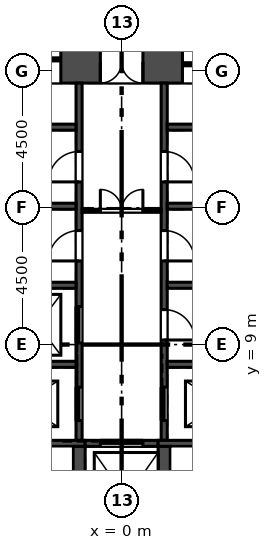
"""IFC4 building model, lengths in metres.
Left out: names, types, materials, properties, quantities, classifications, styles, units other than length and angle.
Written with IfcOpenShell. Run it as: python <this file> out.ifc"""

import sys

from ifc_helpers import new_model, si_unit, direction, frame, frame_2d, origin, place, context, subcontext, project, spatial, rectangle, extrude, element, fill, save


model = new_model("IFC4")
c1 = context("Model", 3, precision=1e-05, world=origin(), true_north=direction((0.0, 1.0)))
c2 = subcontext(c1, "Body", "Model", "MODEL_VIEW")
j1 = project(units=[si_unit("LENGTHUNIT", "METRE"), si_unit("PLANEANGLEUNIT", "RADIAN")], contexts=[c1])
p1 = place(None, origin())
s1 = spatial("IfcSite", under=j1, at=p1, CompositionType="ELEMENT")
p2 = place(p1, origin())
s2 = spatial("IfcBuilding", under=s1, at=p2, CompositionType="ELEMENT")
p3 = place(p2, frame((0.0, 0.0, -8.0)))
s3 = spatial("IfcBuildingStorey", under=s2, at=p3, CompositionType="ELEMENT", Elevation=-8.0)
p4 = place(p3, frame((9.412, 18.3, 0.0), z_axis=(0.0, 0.0, 1.0), x_axis=(-1.0, 0.0, 0.0)))
e1 = element("IfcWall", 1, at=p4, inside=s3, PredefinedType="SHEAR", context=c2, shape_type="SweptSolid", body=[
    extrude(rectangle(XDim=18.823, YDim=1.4, at=frame_2d((9.412, 0.0))), origin(), (0.0, 0.0, 1.0), 8.0),
])
p5 = place(p4, frame((8.711, 0.0, 0.0)))
e2 = element("IfcOpeningElement", 2, at=p5, cuts=e1, PredefinedType="OPENING", context=c2, shape_type="SweptSolid", body=[
    extrude(rectangle(XDim=1.4, YDim=2.1, at=frame_2d((0.7, 1.05))), frame((0.0, 0.71, 0.0), z_axis=(0.0, -1.0, 0.0), x_axis=(1.0, 0.0, 0.0)), (0.0, 0.0, 1.0), 1.42),
])
p6 = place(p4, frame((11.412, 0.0, 0.0)))
e3 = element("IfcOpeningElement", 3, at=p6, cuts=e1, PredefinedType="OPENING", context=c2, shape_type="SweptSolid", body=[
    extrude(rectangle(XDim=6.0, YDim=2.4, at=frame_2d((3.0, 1.2))), frame((0.0, 0.71, 0.0), z_axis=(0.0, -1.0, 0.0), x_axis=(1.0, 0.0, 0.0)), (0.0, 0.0, 1.0), 1.42),
])
p7 = place(p4, frame((1.412, 0.0, 0.0)))
e4 = element("IfcOpeningElement", 4, at=p7, cuts=e1, PredefinedType="OPENING", context=c2, shape_type="SweptSolid", body=[
    extrude(rectangle(XDim=6.0, YDim=2.4, at=frame_2d((3.0, 1.2))), frame((0.0, 0.71, 0.0), z_axis=(0.0, -1.0, 0.0), x_axis=(1.0, 0.0, 0.0)), (0.0, 0.0, 1.0), 1.42),
])
p8 = place(p3, frame((-1.4, 5.85, -0.35), z_axis=(0.0, 0.0, 1.0), x_axis=(0.0, 1.0, 0.0)))
e5 = element("IfcWall", 5, at=p8, inside=s3, PredefinedType="SOLIDWALL", context=c2, shape_type="SweptSolid", body=[
    extrude(rectangle(XDim=11.75, YDim=0.2, at=frame_2d((5.875, 0.0))), origin(), (0.0, 0.0, 1.0), 7.95),
])
p9 = place(p8, frame((3.2, 0.0, 0.35)))
e6 = element("IfcOpeningElement", 6, at=p9, cuts=e5, PredefinedType="OPENING", context=c2, shape_type="SweptSolid", body=[
    extrude(rectangle(XDim=1.2, YDim=2.1, at=frame_2d((0.6, 1.05))), frame((0.0, 0.11, 0.0), z_axis=(0.0, -1.0, 0.0), x_axis=(1.0, 0.0, 0.0)), (0.0, 0.0, 1.0), 0.22),
])
p10 = place(p8, frame((0.65, 0.0, 0.35)))
e7 = element("IfcOpeningElement", 7, at=p10, cuts=e5, PredefinedType="OPENING", context=c2, shape_type="SweptSolid", body=[
    extrude(rectangle(XDim=1.1, YDim=2.1, at=frame_2d((0.55, 1.05))), frame((0.0, 0.11, 0.0), z_axis=(0.0, -1.0, 0.0), x_axis=(1.0, 0.0, 0.0)), (0.0, 0.0, 1.0), 0.22),
])
p11 = place(p8, frame((5.9, 0.0, 0.35)))
e8 = element("IfcOpeningElement", 8, at=p11, cuts=e5, PredefinedType="OPENING", context=c2, shape_type="SweptSolid", body=[
    extrude(rectangle(XDim=1.0, YDim=2.1, at=frame_2d((0.5, 1.05))), frame((0.0, 0.11, 0.0), z_axis=(0.0, -1.0, 0.0), x_axis=(1.0, 0.0, 0.0)), (0.0, 0.0, 1.0), 0.22),
])
p12 = place(p8, frame((8.5, 0.0, 0.35)))
e9 = element("IfcOpeningElement", 9, at=p12, cuts=e5, PredefinedType="OPENING", context=c2, shape_type="SweptSolid", body=[
    extrude(rectangle(XDim=1.0, YDim=2.1, at=frame_2d((0.5, 1.05))), frame((0.0, 0.11, 0.0), z_axis=(0.0, -1.0, 0.0), x_axis=(1.0, 0.0, 0.0)), (0.0, 0.0, 1.0), 0.22),
])
p13 = place(p3, frame((1.4, 5.85, -0.35), z_axis=(0.0, 0.0, 1.0), x_axis=(0.0, 1.0, 0.0)))
e10 = element("IfcWall", 10, at=p13, inside=s3, PredefinedType="SOLIDWALL", context=c2, shape_type="SweptSolid", body=[
    extrude(rectangle(XDim=11.75, YDim=0.2, at=frame_2d((5.875, 0.0))), origin(), (0.0, 0.0, 1.0), 7.95),
])
p14 = place(p13, frame((0.65, 0.0, 0.35)))
e11 = element("IfcOpeningElement", 11, at=p14, cuts=e10, PredefinedType="OPENING", context=c2, shape_type="SweptSolid", body=[
    extrude(rectangle(XDim=1.1, YDim=2.1, at=frame_2d((0.55, 1.05))), frame((0.0, 0.11, 0.0), z_axis=(0.0, -1.0, 0.0), x_axis=(1.0, 0.0, 0.0)), (0.0, 0.0, 1.0), 0.22),
])
p15 = place(p13, frame((3.3, 0.0, 0.35)))
e12 = element("IfcOpeningElement", 12, at=p15, cuts=e10, PredefinedType="OPENING", context=c2, shape_type="SweptSolid", body=[
    extrude(rectangle(XDim=1.0, YDim=2.1, at=frame_2d((0.5, 1.05))), frame((0.0, 0.11, 0.0), z_axis=(0.0, -1.0, 0.0), x_axis=(1.0, 0.0, 0.0)), (0.0, 0.0, 1.0), 0.22),
])
p16 = place(p13, frame((5.9, 0.0, 0.35)))
e13 = element("IfcOpeningElement", 13, at=p16, cuts=e10, PredefinedType="OPENING", context=c2, shape_type="SweptSolid", body=[
    extrude(rectangle(XDim=1.0, YDim=2.1, at=frame_2d((0.5, 1.05))), frame((0.0, 0.11, 0.0), z_axis=(0.0, -1.0, 0.0), x_axis=(1.0, 0.0, 0.0)), (0.0, 0.0, 1.0), 0.22),
])
p17 = place(p13, frame((8.5, 0.0, 0.35)))
e14 = element("IfcOpeningElement", 14, at=p17, cuts=e10, PredefinedType="OPENING", context=c2, shape_type="SweptSolid", body=[
    extrude(rectangle(XDim=1.0, YDim=2.1, at=frame_2d((0.5, 1.05))), frame((0.0, 0.11, 0.0), z_axis=(0.0, -1.0, 0.0), x_axis=(1.0, 0.0, 0.0)), (0.0, 0.0, 1.0), 0.22),
])
for number, where, z_axis, x_axis in (
    (15, (-5.7, 8.35, -0.35), (0.0, 0.0, 1.0), (1.0, 0.0, 0.0)),
    (16, (1.5, 8.35, -0.35), (0.0, 0.0, 1.0), (1.0, 0.0, 0.0)),
):
    element("IfcWall", number, at=place(p3, frame(where, z_axis=z_axis, x_axis=x_axis)), inside=s3, PredefinedType="SOLIDWALL", context=c2, shape_type="SweptSolid", body=[
        extrude(rectangle(XDim=4.2, YDim=0.2, at=frame_2d((2.1, 0.0))), origin(), (0.0, 0.0, 1.0), 7.95),
    ])
p18 = place(p3, frame((-12.6, 5.75, -0.35), z_axis=(0.0, 0.0, 1.0), x_axis=(1.0, 0.0, 0.0)))
e17 = element("IfcWall", 17, at=p18, inside=s3, PredefinedType="SOLIDWALL", context=c2, shape_type="SweptSolid", body=[
    extrude(rectangle(XDim=11.4, YDim=0.2, at=frame_2d((5.7, 0.0))), origin(), (0.0, 0.0, 1.0), 7.95),
])
p19 = place(p3, frame((-1.2, 5.75, -0.35), z_axis=(0.0, 0.0, 1.0), x_axis=(1.0, 0.0, 0.0)))
e18 = element("IfcWall", 18, at=p19, inside=s3, PredefinedType="SOLIDWALL", context=c2, shape_type="SweptSolid", body=[
    extrude(rectangle(XDim=2.4, YDim=0.2, at=frame_2d((1.2, 0.0))), origin(), (0.0, 0.0, 1.0), 7.95),
])
p20 = place(p19, frame((0.5, 0.0, 0.35)))
e19 = element("IfcOpeningElement", 19, at=p20, cuts=e18, PredefinedType="OPENING", context=c2, shape_type="SweptSolid", body=[
    extrude(rectangle(XDim=1.4, YDim=2.1, at=frame_2d((0.7, 1.05))), frame((0.0, 0.11, 0.0), z_axis=(0.0, -1.0, 0.0), x_axis=(1.0, 0.0, 0.0)), (0.0, 0.0, 1.0), 0.22),
])
p21 = place(p3, frame((1.2, 5.75, -0.35), z_axis=(0.0, 0.0, 1.0), x_axis=(1.0, 0.0, 0.0)))
e20 = element("IfcWall", 20, at=p21, inside=s3, PredefinedType="SOLIDWALL", context=c2, shape_type="SweptSolid", body=[
    extrude(rectangle(XDim=11.4, YDim=0.2, at=frame_2d((5.7, 0.0))), origin(), (0.0, 0.0, 1.0), 7.95),
])
for number, where, z_axis, x_axis in (
    (21, (-1.4, 2.25, -0.35), (0.0, 0.0, 1.0), (0.0, 1.0, 0.0)),
    (22, (1.4, 2.25, -0.35), (0.0, 0.0, 1.0), (0.0, 1.0, 0.0)),
):
    element("IfcWall", number, at=place(p3, frame(where, z_axis=z_axis, x_axis=x_axis)), inside=s3, PredefinedType="SOLIDWALL", context=c2, shape_type="SweptSolid", body=[
        extrude(rectangle(XDim=3.4, YDim=0.4, at=frame_2d((1.7, 0.0))), origin(), (0.0, 0.0, 1.0), 7.95),
    ])
for number, where, z_axis, x_axis in (
    (23, (-3.5, 10.95, -0.35), (0.0, 0.0, 1.0), (1.0, 0.0, 0.0)),
    (24, (-3.5, 13.55, -0.35), (0.0, 0.0, 1.0), (1.0, 0.0, 0.0)),
    (25, (-3.5, 16.15, -0.35), (0.0, 0.0, 1.0), (1.0, 0.0, 0.0)),
    (26, (1.5, 10.95, -0.35), (0.0, 0.0, 1.0), (1.0, 0.0, 0.0)),
    (27, (1.5, 13.55, -0.35), (0.0, 0.0, 1.0), (1.0, 0.0, 0.0)),
    (28, (1.5, 16.15, -0.35), (0.0, 0.0, 1.0), (1.0, 0.0, 0.0)),
):
    element("IfcWall", number, at=place(p3, frame(where, z_axis=z_axis, x_axis=x_axis)), inside=s3, PredefinedType="SOLIDWALL", context=c2, shape_type="SweptSolid", body=[
        extrude(rectangle(XDim=2.0, YDim=0.2, at=frame_2d((1.0, 0.0))), origin(), (0.0, 0.0, 1.0), 7.95),
    ])
p22 = place(p3, frame((-1.3, 13.4, 0.0), z_axis=(0.0, 0.0, 1.0), x_axis=(1.0, 0.0, 0.0)))
e29 = element("IfcWall", 29, at=p22, inside=s3, PredefinedType="PARTITIONING", context=c2, shape_type="SweptSolid", body=[
    extrude(rectangle(XDim=2.6, YDim=0.1, at=frame_2d((1.3, 0.0))), origin(), (0.0, 0.0, 1.0), 7.6),
])
p23 = place(p22, frame((0.6, 0.0, 0.0)))
e30 = element("IfcOpeningElement", 30, at=p23, cuts=e29, PredefinedType="OPENING", context=c2, shape_type="SweptSolid", body=[
    extrude(rectangle(XDim=1.4, YDim=2.1, at=frame_2d((0.7, 1.05))), frame((0.0, 0.06, 0.0), z_axis=(0.0, -1.0, 0.0), x_axis=(1.0, 0.0, 0.0)), (0.0, 0.0, 1.0), 0.12),
])
p24 = place(p9, origin())
e31 = element("IfcDoor", 31, at=p24, inside=s3, OperationType="SLIDING_TO_LEFT", PredefinedType="DOOR", context=c2, shape_type="SweptSolid", body=[
    extrude(rectangle(XDim=1.2, YDim=2.1, at=frame_2d((0.6, 1.05))), frame((0.0, 0.025, 0.0), z_axis=(0.0, -1.0, 0.0), x_axis=(1.0, 0.0, 0.0)), (0.0, 0.0, 1.0), 0.05),
])
fill(e6, e31)
p25 = place(p10, origin())
e32 = element("IfcDoor", 32, at=p25, inside=s3, OperationType="SLIDING_TO_RIGHT", PredefinedType="DOOR", context=c2, shape_type="SweptSolid", body=[
    extrude(rectangle(XDim=1.1, YDim=2.1, at=frame_2d((0.55, 1.05))), frame((0.0, 0.025, 0.0), z_axis=(0.0, -1.0, 0.0), x_axis=(1.0, 0.0, 0.0)), (0.0, 0.0, 1.0), 0.05),
])
fill(e7, e32)
p26 = place(p14, origin())
e33 = element("IfcDoor", 33, at=p26, inside=s3, OperationType="SLIDING_TO_RIGHT", PredefinedType="DOOR", context=c2, shape_type="SweptSolid", body=[
    extrude(rectangle(XDim=1.1, YDim=2.1, at=frame_2d((0.55, 1.05))), frame((0.0, 0.025, 0.0), z_axis=(0.0, -1.0, 0.0), x_axis=(1.0, 0.0, 0.0)), (0.0, 0.0, 1.0), 0.05),
])
fill(e11, e33)
p27 = place(p20, origin())
e34 = element("IfcDoor", 34, at=p27, inside=s3, OperationType="SLIDING_TO_LEFT", PredefinedType="DOOR", context=c2, shape_type="SweptSolid", body=[
    extrude(rectangle(XDim=1.4, YDim=2.1, at=frame_2d((0.7, 1.05))), frame((0.0, 0.025, 0.0), z_axis=(0.0, -1.0, 0.0), x_axis=(1.0, 0.0, 0.0)), (0.0, 0.0, 1.0), 0.05),
])
fill(e19, e34)
p28 = place(p11, origin())
e35 = element("IfcDoor", 35, at=p28, inside=s3, OperationType="SINGLE_SWING_LEFT", PredefinedType="DOOR", context=c2, shape_type="SweptSolid", body=[
    extrude(rectangle(XDim=1.0, YDim=2.1, at=frame_2d((0.5, 1.05))), frame((0.0, 0.025, 0.0), z_axis=(0.0, -1.0, 0.0), x_axis=(1.0, 0.0, 0.0)), (0.0, 0.0, 1.0), 0.05),
])
fill(e8, e35)
p29 = place(p12, origin())
e36 = element("IfcDoor", 36, at=p29, inside=s3, OperationType="SINGLE_SWING_LEFT", PredefinedType="DOOR", context=c2, shape_type="SweptSolid", body=[
    extrude(rectangle(XDim=1.0, YDim=2.1, at=frame_2d((0.5, 1.05))), frame((0.0, 0.025, 0.0), z_axis=(0.0, -1.0, 0.0), x_axis=(1.0, 0.0, 0.0)), (0.0, 0.0, 1.0), 0.05),
])
fill(e9, e36)
p30 = place(p15, frame((1.0, 0.0, 0.0), z_axis=(0.0, 0.0, 1.0), x_axis=(-1.0, 0.0, 0.0)))
e37 = element("IfcDoor", 37, at=p30, inside=s3, OperationType="SINGLE_SWING_RIGHT", PredefinedType="DOOR", context=c2, shape_type="SweptSolid", body=[
    extrude(rectangle(XDim=1.0, YDim=2.1, at=frame_2d((0.5, 1.05))), frame((0.0, 0.025, 0.0), z_axis=(0.0, -1.0, 0.0), x_axis=(1.0, 0.0, 0.0)), (0.0, 0.0, 1.0), 0.05),
])
fill(e12, e37)
p31 = place(p16, frame((1.0, 0.0, 0.0), z_axis=(0.0, 0.0, 1.0), x_axis=(-1.0, 0.0, 0.0)))
e38 = element("IfcDoor", 38, at=p31, inside=s3, OperationType="SINGLE_SWING_RIGHT", PredefinedType="DOOR", context=c2, shape_type="SweptSolid", body=[
    extrude(rectangle(XDim=1.0, YDim=2.1, at=frame_2d((0.5, 1.05))), frame((0.0, 0.025, 0.0), z_axis=(0.0, -1.0, 0.0), x_axis=(1.0, 0.0, 0.0)), (0.0, 0.0, 1.0), 0.05),
])
fill(e13, e38)
p32 = place(p17, frame((1.0, 0.0, 0.0), z_axis=(0.0, 0.0, 1.0), x_axis=(-1.0, 0.0, 0.0)))
e39 = element("IfcDoor", 39, at=p32, inside=s3, OperationType="SINGLE_SWING_RIGHT", PredefinedType="DOOR", context=c2, shape_type="SweptSolid", body=[
    extrude(rectangle(XDim=1.0, YDim=2.1, at=frame_2d((0.5, 1.05))), frame((0.0, 0.025, 0.0), z_axis=(0.0, -1.0, 0.0), x_axis=(1.0, 0.0, 0.0)), (0.0, 0.0, 1.0), 0.05),
])
fill(e14, e39)
p33 = place(p23, origin())
e40 = element("IfcDoor", 40, at=p33, inside=s3, OperationType="DOUBLE_DOOR_SINGLE_SWING", PredefinedType="DOOR", context=c2, shape_type="SweptSolid", body=[
    extrude(rectangle(XDim=1.4, YDim=2.1, at=frame_2d((0.7, 1.05))), frame((0.0, 0.025, 0.0), z_axis=(0.0, -1.0, 0.0), x_axis=(1.0, 0.0, 0.0)), (0.0, 0.0, 1.0), 0.05),
])
fill(e30, e40)
p34 = place(p5, origin())
e41 = element("IfcDoor", 41, at=p34, inside=s3, OperationType="DOUBLE_DOOR_SINGLE_SWING", PredefinedType="DOOR", context=c2, shape_type="SweptSolid", body=[
    extrude(rectangle(XDim=1.4, YDim=2.1, at=frame_2d((0.7, 1.05))), frame((0.0, 0.025, 0.0), z_axis=(0.0, -1.0, 0.0), x_axis=(1.0, 0.0, 0.0)), (0.0, 0.0, 1.0), 0.05),
])
fill(e2, e41)
p35 = place(p6, origin())
e42 = element("IfcDoor", 42, at=p35, inside=s3, OperationType="DOUBLE_DOOR_SLIDING", PredefinedType="DOOR", context=c2, shape_type="SweptSolid", body=[
    extrude(rectangle(XDim=6.0, YDim=2.4, at=frame_2d((3.0, 1.2))), frame((0.0, 0.025, 0.0), z_axis=(0.0, -1.0, 0.0), x_axis=(1.0, 0.0, 0.0)), (0.0, 0.0, 1.0), 0.05),
])
fill(e3, e42)
p36 = place(p7, origin())
e43 = element("IfcDoor", 43, at=p36, inside=s3, OperationType="DOUBLE_DOOR_SLIDING", PredefinedType="DOOR", context=c2, shape_type="SweptSolid", body=[
    extrude(rectangle(XDim=6.0, YDim=2.4, at=frame_2d((3.0, 1.2))), frame((0.0, 0.025, 0.0), z_axis=(0.0, -1.0, 0.0), x_axis=(1.0, 0.0, 0.0)), (0.0, 0.0, 1.0), 0.05),
])
fill(e4, e43)
save(model, sys.argv[1])
